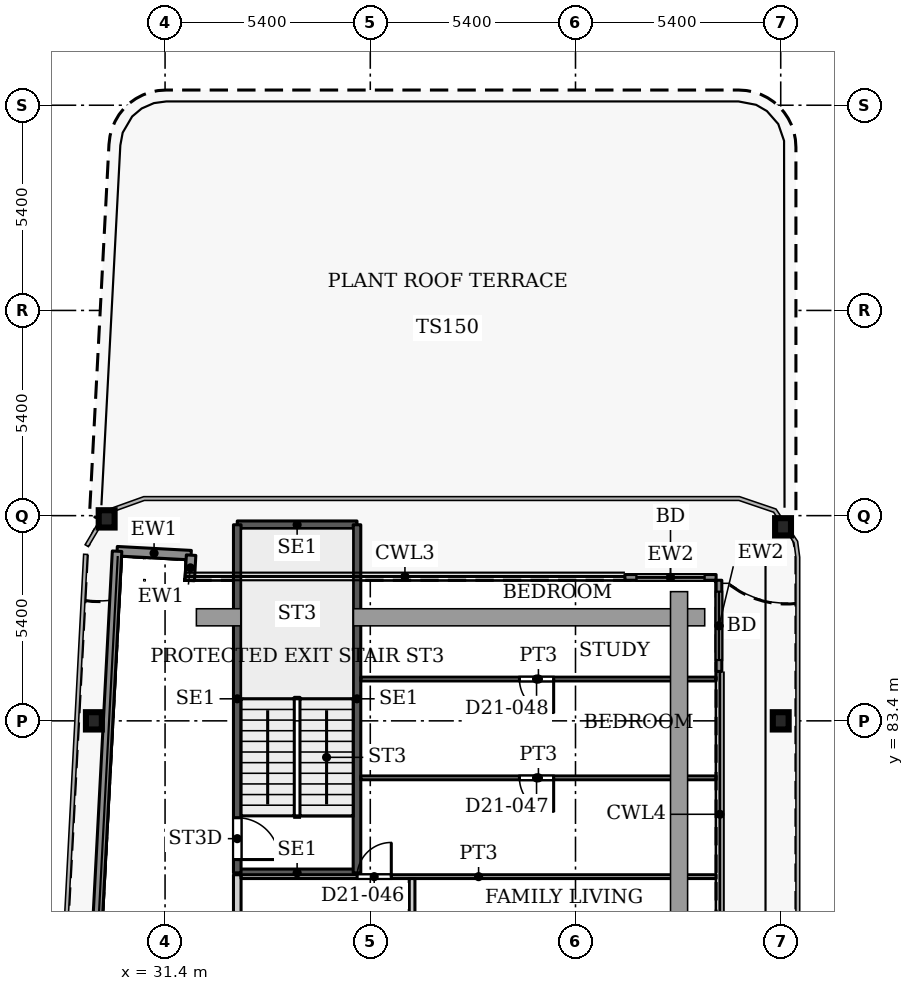
"""IFC4 building model, lengths in metres.
Left out: names, types, materials, properties, quantities, classifications, styles, units other than length and angle.
Written with IfcOpenShell. Run it as: python <this file> out.ifc"""

import sys

from ifc_helpers import new_model, si_unit, direction, frame, frame_2d, origin, origin_2d, place, context, subcontext, project, spatial, rectangle, i_section, extrude, source, transform, mapped, element, fill, save


model = new_model("IFC4")
c1 = context("Model", 3, precision=1e-05, world=origin(), true_north=direction((0.0, 1.0)))
c2 = subcontext(c1, "Body", "Model", "MODEL_VIEW")
j1 = project(units=[si_unit("LENGTHUNIT", "METRE"), si_unit("PLANEANGLEUNIT", "RADIAN")], contexts=[c1])
p1 = place(None, origin())
s1 = spatial("IfcSite", under=j1, at=p1, CompositionType="ELEMENT")
p2 = place(p1, origin())
s2 = spatial("IfcBuilding", under=s1, at=p2, CompositionType="ELEMENT")
p3 = place(p2, frame((0.0, 0.0, 94.1)))
s3 = spatial("IfcBuildingStorey", under=s2, at=p3, CompositionType="ELEMENT", Elevation=94.1)
for number, where, z_axis, x_axis in (
    (1, (29.527, 83.4, 0.0), (0.0, 0.0, 1.0), (1.0, 0.0, 0.0)),
    (2, (47.6, 83.4, 0.0), (0.0, 0.0, 1.0), (1.0, 0.0, 0.0)),
    (3, (47.661, 88.506, 0.0), (0.0, 0.0, 1.0), (1.0, 0.0, 0.0)),
    (4, (29.863, 88.715, 0.0), (0.0, 0.0, 1.0), (1.0, 0.0, 0.0)),
):
    element("IfcColumn", number, at=place(p3, frame(where, z_axis=z_axis, x_axis=x_axis)), inside=s3, PredefinedType="COLUMN", context=c2, shape_type="SweptSolid", body=[
        extrude(i_section(OverallWidth=0.418, OverallDepth=0.455, WebThickness=0.042, FlangeThickness=0.068, FilletRadius=0.014, at=origin_2d()), origin(), (0.0, 0.0, 1.0), 3.9),
    ])
p4 = place(p3, frame((30.137, 87.864, 0.0), z_axis=(0.0, 0.0, 1.0), x_axis=(0.998577785791, -0.053314216913, 0.0)))
e5 = element("IfcWall", 5, at=p4, inside=s3, PredefinedType="SOLIDWALL", context=c2, shape_type="SweptSolid", body=[
    extrude(rectangle(XDim=1.951, YDim=0.25, at=frame_2d((0.975, 0.0))), origin(), (0.0, 0.0, 1.0), 3.75),
])
p5 = place(p3, frame((32.085, 87.76, 0.0), z_axis=(0.0, 0.0, 1.0), x_axis=(-0.053729014033, -0.998555553312, 0.0)))
e6 = element("IfcWall", 6, at=p5, inside=s3, PredefinedType="SOLIDWALL", context=c2, shape_type="SweptSolid", body=[
    extrude(rectangle(XDim=0.668, YDim=0.25, at=frame_2d((0.334, 0.0))), origin(), (0.0, 0.0, 1.0), 3.75),
])
p6 = place(p3, frame((43.5, 87.175, 0.0), z_axis=(0.0, 0.0, 1.0), x_axis=(1.0, 0.0, 0.0)))
e7 = element("IfcWall", 7, at=p6, inside=s3, PredefinedType="SOLIDWALL", context=c2, shape_type="SweptSolid", body=[
    extrude(rectangle(XDim=2.4, YDim=0.15, at=frame_2d((1.2, 0.0))), origin(), (0.0, 0.0, 1.0), 3.75),
])
p7 = place(p6, frame((0.3, 0.0, 0.0)))
e8 = element("IfcOpeningElement", 8, at=p7, cuts=e7, PredefinedType="OPENING", context=c2, shape_type="SweptSolid", body=[
    extrude(rectangle(XDim=1.8, YDim=2.4, at=frame_2d((0.9, 1.2))), frame((0.0, 0.085, 0.0), z_axis=(0.0, -1.0, 0.0), x_axis=(1.0, 0.0, 0.0)), (0.0, 0.0, 1.0), 0.17),
])
p8 = place(p3, frame((45.975, 87.1, 0.0), z_axis=(0.0, 0.0, 1.0), x_axis=(0.0, -1.0, 0.0)))
e9 = element("IfcWall", 9, at=p8, inside=s3, PredefinedType="SOLIDWALL", context=c2, shape_type="SweptSolid", body=[
    extrude(rectangle(XDim=2.4, YDim=0.15, at=frame_2d((1.2, 0.0))), origin(), (0.0, 0.0, 1.0), 3.75),
])
p9 = place(p8, frame((0.3, 0.0, 0.0)))
e10 = element("IfcOpeningElement", 10, at=p9, cuts=e9, PredefinedType="OPENING", context=c2, shape_type="SweptSolid", body=[
    extrude(rectangle(XDim=1.8, YDim=2.4, at=frame_2d((0.9, 1.2))), frame((0.0, 0.085, 0.0), z_axis=(0.0, -1.0, 0.0), x_axis=(1.0, 0.0, 0.0)), (0.0, 0.0, 1.0), 0.17),
])
p10 = place(p3, frame((27.195, 31.969, 0.0), z_axis=(0.0, 0.0, 1.0), x_axis=(0.052559748861, 0.998617781135, 0.0)))
e11 = element("IfcWall", 11, at=p10, inside=s3, PredefinedType="SOLIDWALL", context=c2, shape_type="SweptSolid", body=[
    extrude(rectangle(XDim=55.972, YDim=0.25, at=frame_2d((27.986, 0.0))), origin(), (0.0, 0.0, 1.0), 3.75),
])
for number, where, z_axis, x_axis in (
    (12, (33.3, 79.4, 0.0), (0.0, 0.0, 1.0), (1.0, 0.0, 0.0)),
    (13, (33.3, 88.56, 0.0), (0.0, 0.0, 1.0), (1.0, 0.0, 0.0)),
):
    element("IfcWall", number, at=place(p3, frame(where, z_axis=z_axis, x_axis=x_axis)), inside=s3, PredefinedType="SHEAR", context=c2, shape_type="SweptSolid", body=[
        extrude(rectangle(XDim=3.15, YDim=0.2, at=frame_2d((1.575, 0.0))), origin(), (0.0, 0.0, 1.0), 3.9),
    ])
p11 = place(p3, frame((33.3, 79.4, 0.0), z_axis=(0.0, 0.0, 1.0), x_axis=(0.0, 1.0, 0.0)))
e14 = element("IfcWall", 14, at=p11, inside=s3, PredefinedType="SHEAR", context=c2, shape_type="SweptSolid", body=[
    extrude(rectangle(XDim=9.16, YDim=0.2, at=frame_2d((4.58, 0.0))), origin(), (0.0, 0.0, 1.0), 3.9),
])
p12 = place(p11, frame((0.35, 0.0, 0.0)))
e15 = element("IfcOpeningElement", 15, at=p12, cuts=e14, PredefinedType="OPENING", context=c2, shape_type="SweptSolid", body=[
    extrude(rectangle(XDim=1.1, YDim=2.2, at=frame_2d((0.55, 1.1))), frame((0.0, 0.11, 0.0), z_axis=(0.0, -1.0, 0.0), x_axis=(1.0, 0.0, 0.0)), (0.0, 0.0, 1.0), 0.22),
])
p13 = place(p3, frame((36.45, 79.4, 0.0), z_axis=(0.0, 0.0, 1.0), x_axis=(0.0, 1.0, 0.0)))
e16 = element("IfcWall", 16, at=p13, inside=s3, PredefinedType="SHEAR", context=c2, shape_type="SweptSolid", body=[
    extrude(rectangle(XDim=9.16, YDim=0.2, at=frame_2d((4.58, 0.0))), origin(), (0.0, 0.0, 1.0), 3.9),
])
p14 = place(p3, frame((33.3, 54.4, 0.0), z_axis=(0.0, 0.0, 1.0), x_axis=(0.0, 1.0, 0.0)))
e17 = element("IfcWall", 17, at=p14, inside=s3, PredefinedType="PARTITIONING", context=c2, shape_type="SweptSolid", body=[
    extrude(rectangle(XDim=24.95, YDim=0.2, at=frame_2d((12.475, 0.0))), origin(), (0.0, 0.0, 1.0), 3.6),
])
p15 = place(p14, frame((5.5, 0.0, 0.0)))
e18 = element("IfcOpeningElement", 18, at=p15, cuts=e17, PredefinedType="OPENING", context=c2, shape_type="SweptSolid", body=[
    extrude(rectangle(XDim=1.0, YDim=2.1, at=frame_2d((0.5, 1.05))), frame((0.0, 0.11, 0.0), z_axis=(0.0, -1.0, 0.0), x_axis=(1.0, 0.0, 0.0)), (0.0, 0.0, 1.0), 0.22),
])
p16 = place(p14, frame((22.3, 0.0, 0.0)))
e19 = element("IfcOpeningElement", 19, at=p16, cuts=e17, PredefinedType="OPENING", context=c2, shape_type="SweptSolid", body=[
    extrude(rectangle(XDim=1.0, YDim=2.1, at=frame_2d((0.5, 1.05))), frame((0.0, 0.11, 0.0), z_axis=(0.0, -1.0, 0.0), x_axis=(1.0, 0.0, 0.0)), (0.0, 0.0, 1.0), 0.22),
])
p17 = place(p3, frame((33.4, 79.3, 0.0), z_axis=(0.0, 0.0, 1.0), x_axis=(1.0, 0.0, 0.0)))
e20 = element("IfcWall", 20, at=p17, inside=s3, PredefinedType="PARTITIONING", context=c2, shape_type="SweptSolid", body=[
    extrude(rectangle(XDim=12.5, YDim=0.1, at=frame_2d((6.25, 0.0))), origin(), (0.0, 0.0, 1.0), 3.6),
])
p18 = place(p17, frame((3.053, 0.0, 0.0)))
e21 = element("IfcOpeningElement", 21, at=p18, cuts=e20, PredefinedType="OPENING", context=c2, shape_type="SweptSolid", body=[
    extrude(rectangle(XDim=0.9, YDim=2.1, at=frame_2d((0.45, 1.05))), frame((0.0, 0.06, 0.0), z_axis=(0.0, -1.0, 0.0), x_axis=(1.0, 0.0, 0.0)), (0.0, 0.0, 1.0), 0.12),
])
p19 = place(p3, frame((36.549, 81.9, 0.0), z_axis=(0.0, 0.0, 1.0), x_axis=(1.0, 0.0, 0.0)))
e22 = element("IfcWall", 22, at=p19, inside=s3, PredefinedType="PARTITIONING", context=c2, shape_type="SweptSolid", body=[
    extrude(rectangle(XDim=9.351, YDim=0.1, at=frame_2d((4.675, 0.0))), origin(), (0.0, 0.0, 1.0), 3.6),
])
p20 = place(p19, frame((4.176, 0.0, 0.0)))
e23 = element("IfcOpeningElement", 23, at=p20, cuts=e22, PredefinedType="OPENING", context=c2, shape_type="SweptSolid", body=[
    extrude(rectangle(XDim=0.9, YDim=2.1, at=frame_2d((0.45, 1.05))), frame((0.0, 0.06, 0.0), z_axis=(0.0, -1.0, 0.0), x_axis=(1.0, 0.0, 0.0)), (0.0, 0.0, 1.0), 0.12),
])
p21 = place(p3, frame((36.549, 84.5, 0.0), z_axis=(0.0, 0.0, 1.0), x_axis=(1.0, 0.0, 0.0)))
e24 = element("IfcWall", 24, at=p21, inside=s3, PredefinedType="PARTITIONING", context=c2, shape_type="SweptSolid", body=[
    extrude(rectangle(XDim=9.351, YDim=0.1, at=frame_2d((4.675, 0.0))), origin(), (0.0, 0.0, 1.0), 3.6),
])
p22 = place(p21, frame((4.176, 0.0, 0.0)))
e25 = element("IfcOpeningElement", 25, at=p22, cuts=e24, PredefinedType="OPENING", context=c2, shape_type="SweptSolid", body=[
    extrude(rectangle(XDim=0.9, YDim=2.1, at=frame_2d((0.45, 1.05))), frame((0.0, 0.06, 0.0), z_axis=(0.0, -1.0, 0.0), x_axis=(1.0, 0.0, 0.0)), (0.0, 0.0, 1.0), 0.12),
])
p23 = place(p3, frame((37.9, 62.9, 0.0), z_axis=(0.0, 0.0, 1.0), x_axis=(0.0, 1.0, 0.0)))
e26 = element("IfcWall", 26, at=p23, inside=s3, PredefinedType="PARTITIONING", context=c2, shape_type="SweptSolid", body=[
    extrude(rectangle(XDim=16.35, YDim=0.15, at=frame_2d((8.175, 0.0))), origin(), (0.0, 0.0, 1.0), 3.6),
])
p24 = place(p23, frame((4.85, 0.0, 0.0)))
e27 = element("IfcOpeningElement", 27, at=p24, cuts=e26, PredefinedType="OPENING", context=c2, shape_type="SweptSolid", body=[
    extrude(rectangle(XDim=0.9, YDim=2.1, at=frame_2d((0.45, 1.05))), frame((0.0, 0.085, 0.0), z_axis=(0.0, -1.0, 0.0), x_axis=(1.0, 0.0, 0.0)), (0.0, 0.0, 1.0), 0.17),
])
p25 = place(p23, frame((8.0, 0.0, 0.0)))
e28 = element("IfcOpeningElement", 28, at=p25, cuts=e26, PredefinedType="OPENING", context=c2, shape_type="SweptSolid", body=[
    extrude(rectangle(XDim=0.9, YDim=2.1, at=frame_2d((0.45, 1.05))), frame((0.0, 0.085, 0.0), z_axis=(0.0, -1.0, 0.0), x_axis=(1.0, 0.0, 0.0)), (0.0, 0.0, 1.0), 0.17),
])
p26 = place(p23, frame((14.25, 0.0, 0.0)))
e29 = element("IfcOpeningElement", 29, at=p26, cuts=e26, PredefinedType="OPENING", context=c2, shape_type="SweptSolid", body=[
    extrude(rectangle(XDim=1.0, YDim=2.1, at=frame_2d((0.5, 1.05))), frame((0.0, 0.085, 0.0), z_axis=(0.0, -1.0, 0.0), x_axis=(1.0, 0.0, 0.0)), (0.0, 0.0, 1.0), 0.17),
])
p27 = place(p23, frame((10.8, 0.0, 0.0)))
e30 = element("IfcOpeningElement", 30, at=p27, cuts=e26, PredefinedType="OPENING", context=c2, shape_type="SweptSolid", body=[
    extrude(rectangle(XDim=1.6, YDim=2.1, at=frame_2d((0.8, 1.05))), frame((0.0, 0.085, 0.0), z_axis=(0.0, -1.0, 0.0), x_axis=(1.0, 0.0, 0.0)), (0.0, 0.0, 1.0), 0.17),
])
p28 = place(p23, frame((0.35, 0.0, 0.0)))
e31 = element("IfcOpeningElement", 31, at=p28, cuts=e26, PredefinedType="OPENING", context=c2, shape_type="SweptSolid", body=[
    extrude(rectangle(XDim=0.9, YDim=2.1, at=frame_2d((0.45, 1.05))), frame((0.0, 0.085, 0.0), z_axis=(0.0, -1.0, 0.0), x_axis=(1.0, 0.0, 0.0)), (0.0, 0.0, 1.0), 0.17),
])
m1 = source(origin(), c2, "Body", "SweptSolid", [
    extrude(rectangle(XDim=1.8, YDim=2.4, at=frame_2d((0.9, 1.2))), frame((0.0, 0.025, 0.0), z_axis=(0.0, -1.0, 0.0), x_axis=(1.0, 0.0, 0.0)), (0.0, 0.0, 1.0), 0.05),
])
p29 = place(p7, origin())
e32 = element("IfcDoor", 32, at=p29, inside=s3, OperationType="SLIDING_TO_LEFT", PredefinedType="DOOR", context=c2, shape_type="MappedRepresentation", body=[
    mapped(m1, transform((0.0, 0.0, 0.0), x_axis=(1.0, 0.0, 0.0), y_axis=(0.0, 1.0, 0.0), z_axis=(0.0, 0.0, 1.0), scale=1.0)),
])
fill(e8, e32)
p30 = place(p9, origin())
e33 = element("IfcDoor", 33, at=p30, inside=s3, OperationType="SLIDING_TO_LEFT", PredefinedType="DOOR", context=c2, shape_type="MappedRepresentation", body=[
    mapped(m1, transform((0.0, 0.0, 0.0), x_axis=(1.0, 0.0, 0.0), y_axis=(0.0, 1.0, 0.0), z_axis=(0.0, 0.0, 1.0), scale=1.0)),
])
fill(e10, e33)
m2 = source(origin(), c2, "Body", "SweptSolid", [
    extrude(rectangle(XDim=1.1, YDim=2.2, at=frame_2d((0.55, 1.1))), frame((0.0, 0.025, 0.0), z_axis=(0.0, -1.0, 0.0), x_axis=(1.0, 0.0, 0.0)), (0.0, 0.0, 1.0), 0.05),
])
p31 = place(p12, origin())
e34 = element("IfcDoor", 34, at=p31, inside=s3, OperationType="SINGLE_SWING_RIGHT", PredefinedType="DOOR", context=c2, shape_type="MappedRepresentation", body=[
    mapped(m2, transform((0.0, 0.0, 0.0), x_axis=(1.0, 0.0, 0.0), y_axis=(0.0, 1.0, 0.0), z_axis=(0.0, 0.0, 1.0), scale=1.0)),
])
fill(e15, e34)
m3 = source(origin(), c2, "Body", "SweptSolid", [
    extrude(rectangle(XDim=0.9, YDim=2.1, at=frame_2d((0.45, 1.05))), frame((0.0, 0.025, 0.0), z_axis=(0.0, -1.0, 0.0), x_axis=(1.0, 0.0, 0.0)), (0.0, 0.0, 1.0), 0.05),
])
p32 = place(p18, origin())
e35 = element("IfcDoor", 35, at=p32, inside=s3, OperationType="SINGLE_SWING_LEFT", PredefinedType="DOOR", context=c2, shape_type="MappedRepresentation", body=[
    mapped(m3, transform((0.0, 0.0, 0.0), x_axis=(1.0, 0.0, 0.0), y_axis=(0.0, 1.0, 0.0), z_axis=(0.0, 0.0, 1.0), scale=1.0)),
])
fill(e21, e35)
p33 = place(p20, origin())
e36 = element("IfcDoor", 36, at=p33, inside=s3, OperationType="SINGLE_SWING_RIGHT", PredefinedType="DOOR", context=c2, shape_type="MappedRepresentation", body=[
    mapped(m3, transform((0.0, 0.0, 0.0), x_axis=(1.0, 0.0, 0.0), y_axis=(0.0, 1.0, 0.0), z_axis=(0.0, 0.0, 1.0), scale=1.0)),
])
fill(e23, e36)
p34 = place(p22, origin())
e37 = element("IfcDoor", 37, at=p34, inside=s3, OperationType="SINGLE_SWING_RIGHT", PredefinedType="DOOR", context=c2, shape_type="MappedRepresentation", body=[
    mapped(m3, transform((0.0, 0.0, 0.0), x_axis=(1.0, 0.0, 0.0), y_axis=(0.0, 1.0, 0.0), z_axis=(0.0, 0.0, 1.0), scale=1.0)),
])
fill(e25, e37)
save(model, sys.argv[1])
